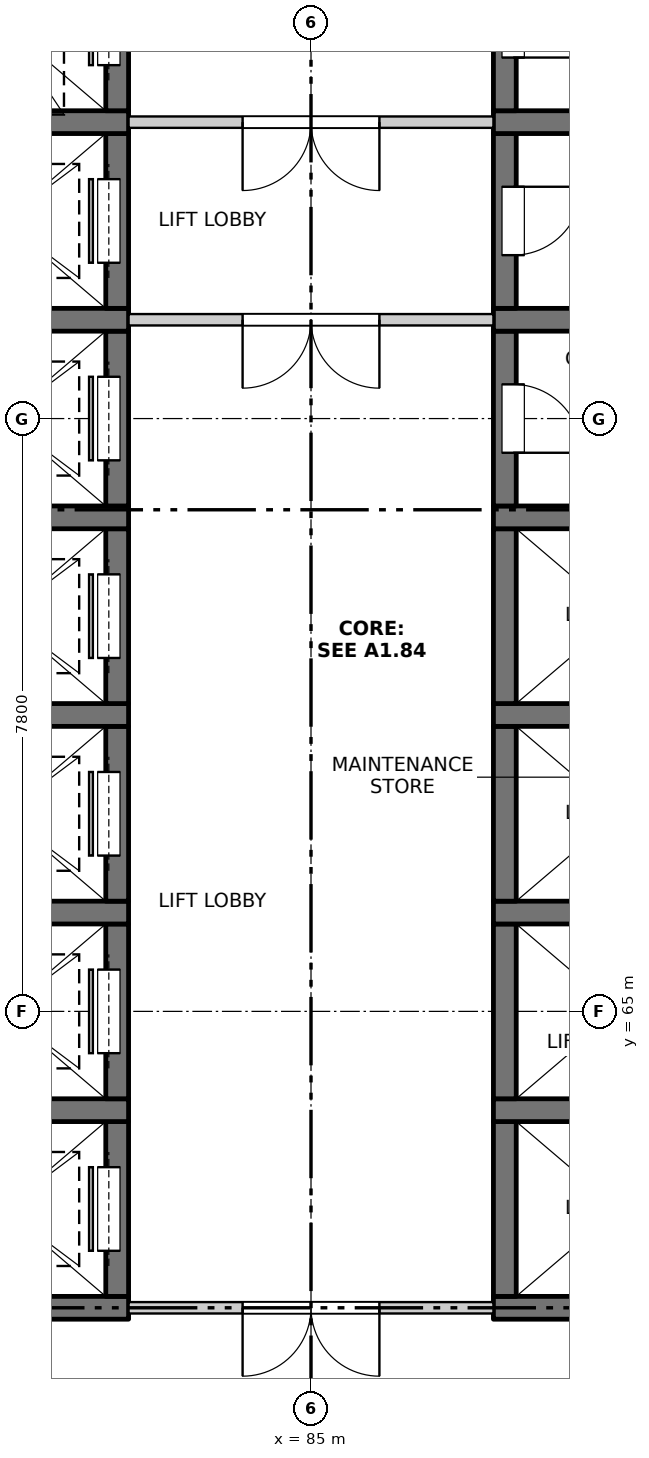
"""IFC4 building model, lengths in metres.
Left out: names, types, materials, properties, quantities, classifications, styles, units other than length and angle.
Written with IfcOpenShell. Run it as: python <this file> out.ifc"""

import sys

from ifc_helpers import new_model, si_unit, direction, frame, frame_2d, origin, place, context, subcontext, project, spatial, rectangle, extrude, element, fill, save


model = new_model("IFC4")
c1 = context("Model", 3, precision=1e-05, world=origin(), true_north=direction((0.0, 1.0)))
c2 = subcontext(c1, "Body", "Model", "MODEL_VIEW")
j1 = project(units=[si_unit("LENGTHUNIT", "METRE"), si_unit("PLANEANGLEUNIT", "RADIAN")], contexts=[c1])
p1 = place(None, origin())
s1 = spatial("IfcSite", under=j1, at=p1, CompositionType="ELEMENT")
p2 = place(p1, origin())
s2 = spatial("IfcBuilding", under=s1, at=p2, CompositionType="ELEMENT")
p3 = place(p2, frame((0.0, 0.0, 99.9)))
s3 = spatial("IfcBuildingStorey", under=s2, at=p3, CompositionType="ELEMENT", Elevation=99.9)
p4 = place(p3, frame((79.6, 61.1, -0.3), z_axis=(0.0, 0.0, 1.0), x_axis=(1.0, 0.0, 0.0)))
e1 = element("IfcWall", 1, at=p4, inside=s3, PredefinedType="SOLIDWALL", context=c2, shape_type="SweptSolid", body=[
    extrude(rectangle(XDim=3.0, YDim=0.3, at=frame_2d((1.5, 0.0))), origin(), (0.0, 0.0, 1.0), 3.45),
])
p5 = place(p3, frame((82.45, 61.25, -0.3), z_axis=(0.0, 0.0, 1.0), x_axis=(0.0, 1.0, 0.0)))
e2 = element("IfcWall", 2, at=p5, inside=s3, PredefinedType="SOLIDWALL", context=c2, shape_type="SweptSolid", body=[
    extrude(rectangle(XDim=2.3, YDim=0.3, at=frame_2d((1.15, 0.0))), origin(), (0.0, 0.0, 1.0), 3.45),
])
p6 = place(p5, frame((0.6, 0.0, 0.3)))
e3 = element("IfcOpeningElement", 3, at=p6, cuts=e2, PredefinedType="OPENING", context=c2, shape_type="SweptSolid", body=[
    extrude(rectangle(XDim=1.1, YDim=2.1, at=frame_2d((0.55, 1.05))), frame((0.0, 0.16, 0.0), z_axis=(0.0, -1.0, 0.0), x_axis=(1.0, 0.0, 0.0)), (0.0, 0.0, 1.0), 0.32),
])
p7 = place(p3, frame((79.6, 63.7, -0.3), z_axis=(0.0, 0.0, 1.0), x_axis=(1.0, 0.0, 0.0)))
e4 = element("IfcWall", 4, at=p7, inside=s3, PredefinedType="SOLIDWALL", context=c2, shape_type="SweptSolid", body=[
    extrude(rectangle(XDim=3.0, YDim=0.3, at=frame_2d((1.5, 0.0))), origin(), (0.0, 0.0, 1.0), 3.45),
])
p8 = place(p3, frame((82.45, 63.85, -0.3), z_axis=(0.0, 0.0, 1.0), x_axis=(0.0, 1.0, 0.0)))
e5 = element("IfcWall", 5, at=p8, inside=s3, PredefinedType="SOLIDWALL", context=c2, shape_type="SweptSolid", body=[
    extrude(rectangle(XDim=2.3, YDim=0.3, at=frame_2d((1.15, 0.0))), origin(), (0.0, 0.0, 1.0), 3.45),
])
p9 = place(p8, frame((0.6, 0.0, 0.3)))
e6 = element("IfcOpeningElement", 6, at=p9, cuts=e5, PredefinedType="OPENING", context=c2, shape_type="SweptSolid", body=[
    extrude(rectangle(XDim=1.1, YDim=2.1, at=frame_2d((0.55, 1.05))), frame((0.0, 0.16, 0.0), z_axis=(0.0, -1.0, 0.0), x_axis=(1.0, 0.0, 0.0)), (0.0, 0.0, 1.0), 0.32),
])
p10 = place(p3, frame((79.6, 66.3, -0.3), z_axis=(0.0, 0.0, 1.0), x_axis=(1.0, 0.0, 0.0)))
e7 = element("IfcWall", 7, at=p10, inside=s3, PredefinedType="SOLIDWALL", context=c2, shape_type="SweptSolid", body=[
    extrude(rectangle(XDim=3.0, YDim=0.3, at=frame_2d((1.5, 0.0))), origin(), (0.0, 0.0, 1.0), 3.45),
])
p11 = place(p3, frame((82.45, 66.45, -0.3), z_axis=(0.0, 0.0, 1.0), x_axis=(0.0, 1.0, 0.0)))
e8 = element("IfcWall", 8, at=p11, inside=s3, PredefinedType="SOLIDWALL", context=c2, shape_type="SweptSolid", body=[
    extrude(rectangle(XDim=2.3, YDim=0.3, at=frame_2d((1.15, 0.0))), origin(), (0.0, 0.0, 1.0), 3.45),
])
p12 = place(p11, frame((0.6, 0.0, 0.3)))
e9 = element("IfcOpeningElement", 9, at=p12, cuts=e8, PredefinedType="OPENING", context=c2, shape_type="SweptSolid", body=[
    extrude(rectangle(XDim=1.1, YDim=2.1, at=frame_2d((0.55, 1.05))), frame((0.0, 0.16, 0.0), z_axis=(0.0, -1.0, 0.0), x_axis=(1.0, 0.0, 0.0)), (0.0, 0.0, 1.0), 0.32),
])
p13 = place(p3, frame((79.6, 68.9, -0.3), z_axis=(0.0, 0.0, 1.0), x_axis=(1.0, 0.0, 0.0)))
e10 = element("IfcWall", 10, at=p13, inside=s3, PredefinedType="SOLIDWALL", context=c2, shape_type="SweptSolid", body=[
    extrude(rectangle(XDim=3.0, YDim=0.3, at=frame_2d((1.5, 0.0))), origin(), (0.0, 0.0, 1.0), 3.45),
])
p14 = place(p3, frame((82.45, 69.05, -0.3), z_axis=(0.0, 0.0, 1.0), x_axis=(0.0, 1.0, 0.0)))
e11 = element("IfcWall", 11, at=p14, inside=s3, PredefinedType="SOLIDWALL", context=c2, shape_type="SweptSolid", body=[
    extrude(rectangle(XDim=2.3, YDim=0.3, at=frame_2d((1.15, 0.0))), origin(), (0.0, 0.0, 1.0), 3.45),
])
p15 = place(p14, frame((0.6, 0.0, 0.3)))
e12 = element("IfcOpeningElement", 12, at=p15, cuts=e11, PredefinedType="OPENING", context=c2, shape_type="SweptSolid", body=[
    extrude(rectangle(XDim=1.1, YDim=2.1, at=frame_2d((0.55, 1.05))), frame((0.0, 0.16, 0.0), z_axis=(0.0, -1.0, 0.0), x_axis=(1.0, 0.0, 0.0)), (0.0, 0.0, 1.0), 0.32),
])
p16 = place(p3, frame((79.6, 71.5, -0.3), z_axis=(0.0, 0.0, 1.0), x_axis=(1.0, 0.0, 0.0)))
e13 = element("IfcWall", 13, at=p16, inside=s3, PredefinedType="SOLIDWALL", context=c2, shape_type="SweptSolid", body=[
    extrude(rectangle(XDim=3.0, YDim=0.3, at=frame_2d((1.5, 0.0))), origin(), (0.0, 0.0, 1.0), 3.45),
])
p17 = place(p3, frame((82.45, 71.65, -0.3), z_axis=(0.0, 0.0, 1.0), x_axis=(0.0, 1.0, 0.0)))
e14 = element("IfcWall", 14, at=p17, inside=s3, PredefinedType="SOLIDWALL", context=c2, shape_type="SweptSolid", body=[
    extrude(rectangle(XDim=2.3, YDim=0.3, at=frame_2d((1.15, 0.0))), origin(), (0.0, 0.0, 1.0), 3.45),
])
p18 = place(p17, frame((0.6, 0.0, 0.3)))
e15 = element("IfcOpeningElement", 15, at=p18, cuts=e14, PredefinedType="OPENING", context=c2, shape_type="SweptSolid", body=[
    extrude(rectangle(XDim=1.1, YDim=2.1, at=frame_2d((0.55, 1.05))), frame((0.0, 0.16, 0.0), z_axis=(0.0, -1.0, 0.0), x_axis=(1.0, 0.0, 0.0)), (0.0, 0.0, 1.0), 0.32),
])
p19 = place(p3, frame((79.6, 74.1, -0.3), z_axis=(0.0, 0.0, 1.0), x_axis=(1.0, 0.0, 0.0)))
e16 = element("IfcWall", 16, at=p19, inside=s3, PredefinedType="SOLIDWALL", context=c2, shape_type="SweptSolid", body=[
    extrude(rectangle(XDim=3.0, YDim=0.3, at=frame_2d((1.5, 0.0))), origin(), (0.0, 0.0, 1.0), 3.45),
])
p20 = place(p3, frame((82.45, 74.25, -0.3), z_axis=(0.0, 0.0, 1.0), x_axis=(0.0, 1.0, 0.0)))
e17 = element("IfcWall", 17, at=p20, inside=s3, PredefinedType="SOLIDWALL", context=c2, shape_type="SweptSolid", body=[
    extrude(rectangle(XDim=2.3, YDim=0.3, at=frame_2d((1.15, 0.0))), origin(), (0.0, 0.0, 1.0), 3.45),
])
p21 = place(p20, frame((0.6, 0.0, 0.3)))
e18 = element("IfcOpeningElement", 18, at=p21, cuts=e17, PredefinedType="OPENING", context=c2, shape_type="SweptSolid", body=[
    extrude(rectangle(XDim=1.1, YDim=2.1, at=frame_2d((0.55, 1.05))), frame((0.0, 0.16, 0.0), z_axis=(0.0, -1.0, 0.0), x_axis=(1.0, 0.0, 0.0)), (0.0, 0.0, 1.0), 0.32),
])
p22 = place(p3, frame((79.6, 76.7, -0.3), z_axis=(0.0, 0.0, 1.0), x_axis=(1.0, 0.0, 0.0)))
e19 = element("IfcWall", 19, at=p22, inside=s3, PredefinedType="SOLIDWALL", context=c2, shape_type="SweptSolid", body=[
    extrude(rectangle(XDim=3.0, YDim=0.3, at=frame_2d((1.5, 0.0))), origin(), (0.0, 0.0, 1.0), 3.45),
])
p23 = place(p3, frame((82.45, 76.85, -0.3), z_axis=(0.0, 0.0, 1.0), x_axis=(0.0, 1.0, 0.0)))
e20 = element("IfcWall", 20, at=p23, inside=s3, PredefinedType="SOLIDWALL", context=c2, shape_type="SweptSolid", body=[
    extrude(rectangle(XDim=2.3, YDim=0.3, at=frame_2d((1.15, 0.0))), origin(), (0.0, 0.0, 1.0), 3.45),
])
p24 = place(p23, frame((0.6, 0.0, 0.3)))
e21 = element("IfcOpeningElement", 21, at=p24, cuts=e20, PredefinedType="OPENING", context=c2, shape_type="SweptSolid", body=[
    extrude(rectangle(XDim=1.1, YDim=2.1, at=frame_2d((0.55, 1.05))), frame((0.0, 0.16, 0.0), z_axis=(0.0, -1.0, 0.0), x_axis=(1.0, 0.0, 0.0)), (0.0, 0.0, 1.0), 0.32),
])
p25 = place(p3, frame((87.4, 61.1, -0.3), z_axis=(0.0, 0.0, 1.0), x_axis=(1.0, 0.0, 0.0)))
e22 = element("IfcWall", 22, at=p25, inside=s3, PredefinedType="SOLIDWALL", context=c2, shape_type="SweptSolid", body=[
    extrude(rectangle(XDim=3.0, YDim=0.3, at=frame_2d((1.5, 0.0))), origin(), (0.0, 0.0, 1.0), 3.45),
])
p26 = place(p3, frame((87.55, 61.25, -0.3), z_axis=(0.0, 0.0, 1.0), x_axis=(0.0, 1.0, 0.0)))
e23 = element("IfcWall", 23, at=p26, inside=s3, PredefinedType="SOLIDWALL", context=c2, shape_type="SweptSolid", body=[
    extrude(rectangle(XDim=2.3, YDim=0.3, at=frame_2d((1.15, 0.0))), origin(), (0.0, 0.0, 1.0), 3.45),
])
p27 = place(p3, frame((87.4, 63.7, -0.3), z_axis=(0.0, 0.0, 1.0), x_axis=(1.0, 0.0, 0.0)))
e24 = element("IfcWall", 24, at=p27, inside=s3, PredefinedType="SOLIDWALL", context=c2, shape_type="SweptSolid", body=[
    extrude(rectangle(XDim=3.0, YDim=0.3, at=frame_2d((1.5, 0.0))), origin(), (0.0, 0.0, 1.0), 3.45),
])
p28 = place(p3, frame((87.55, 63.85, -0.3), z_axis=(0.0, 0.0, 1.0), x_axis=(0.0, 1.0, 0.0)))
e25 = element("IfcWall", 25, at=p28, inside=s3, PredefinedType="SOLIDWALL", context=c2, shape_type="SweptSolid", body=[
    extrude(rectangle(XDim=2.3, YDim=0.3, at=frame_2d((1.15, 0.0))), origin(), (0.0, 0.0, 1.0), 3.45),
])
p29 = place(p3, frame((87.4, 66.3, -0.3), z_axis=(0.0, 0.0, 1.0), x_axis=(1.0, 0.0, 0.0)))
e26 = element("IfcWall", 26, at=p29, inside=s3, PredefinedType="SOLIDWALL", context=c2, shape_type="SweptSolid", body=[
    extrude(rectangle(XDim=3.0, YDim=0.3, at=frame_2d((1.5, 0.0))), origin(), (0.0, 0.0, 1.0), 3.45),
])
p30 = place(p3, frame((87.55, 66.45, -0.3), z_axis=(0.0, 0.0, 1.0), x_axis=(0.0, 1.0, 0.0)))
e27 = element("IfcWall", 27, at=p30, inside=s3, PredefinedType="SOLIDWALL", context=c2, shape_type="SweptSolid", body=[
    extrude(rectangle(XDim=2.3, YDim=0.3, at=frame_2d((1.15, 0.0))), origin(), (0.0, 0.0, 1.0), 3.45),
])
p31 = place(p3, frame((87.4, 68.9, -0.3), z_axis=(0.0, 0.0, 1.0), x_axis=(1.0, 0.0, 0.0)))
e28 = element("IfcWall", 28, at=p31, inside=s3, PredefinedType="SOLIDWALL", context=c2, shape_type="SweptSolid", body=[
    extrude(rectangle(XDim=3.0, YDim=0.3, at=frame_2d((1.5, 0.0))), origin(), (0.0, 0.0, 1.0), 3.45),
])
p32 = place(p3, frame((87.55, 69.05, -0.3), z_axis=(0.0, 0.0, 1.0), x_axis=(0.0, 1.0, 0.0)))
e29 = element("IfcWall", 29, at=p32, inside=s3, PredefinedType="SOLIDWALL", context=c2, shape_type="SweptSolid", body=[
    extrude(rectangle(XDim=2.3, YDim=0.3, at=frame_2d((1.15, 0.0))), origin(), (0.0, 0.0, 1.0), 3.45),
])
p33 = place(p3, frame((87.4, 71.5, -0.3), z_axis=(0.0, 0.0, 1.0), x_axis=(1.0, 0.0, 0.0)))
e30 = element("IfcWall", 30, at=p33, inside=s3, PredefinedType="SOLIDWALL", context=c2, shape_type="SweptSolid", body=[
    extrude(rectangle(XDim=3.0, YDim=0.3, at=frame_2d((1.5, 0.0))), origin(), (0.0, 0.0, 1.0), 3.45),
])
p34 = place(p3, frame((87.55, 71.65, -0.3), z_axis=(0.0, 0.0, 1.0), x_axis=(0.0, 1.0, 0.0)))
e31 = element("IfcWall", 31, at=p34, inside=s3, PredefinedType="SOLIDWALL", context=c2, shape_type="SweptSolid", body=[
    extrude(rectangle(XDim=2.3, YDim=0.3, at=frame_2d((1.15, 0.0))), origin(), (0.0, 0.0, 1.0), 3.45),
])
p35 = place(p34, frame((0.7, 0.0, 0.3)))
e32 = element("IfcOpeningElement", 32, at=p35, cuts=e31, PredefinedType="OPENING", context=c2, shape_type="SweptSolid", body=[
    extrude(rectangle(XDim=0.9, YDim=2.1, at=frame_2d((0.45, 1.05))), frame((0.0, 0.16, 0.0), z_axis=(0.0, -1.0, 0.0), x_axis=(1.0, 0.0, 0.0)), (0.0, 0.0, 1.0), 0.32),
])
p36 = place(p3, frame((87.4, 74.1, -0.3), z_axis=(0.0, 0.0, 1.0), x_axis=(1.0, 0.0, 0.0)))
e33 = element("IfcWall", 33, at=p36, inside=s3, PredefinedType="SOLIDWALL", context=c2, shape_type="SweptSolid", body=[
    extrude(rectangle(XDim=3.0, YDim=0.3, at=frame_2d((1.5, 0.0))), origin(), (0.0, 0.0, 1.0), 3.45),
])
p37 = place(p3, frame((87.55, 74.25, -0.3), z_axis=(0.0, 0.0, 1.0), x_axis=(0.0, 1.0, 0.0)))
e34 = element("IfcWall", 34, at=p37, inside=s3, PredefinedType="SOLIDWALL", context=c2, shape_type="SweptSolid", body=[
    extrude(rectangle(XDim=2.3, YDim=0.3, at=frame_2d((1.15, 0.0))), origin(), (0.0, 0.0, 1.0), 3.45),
])
p38 = place(p37, frame((0.7, 0.0, 0.3)))
e35 = element("IfcOpeningElement", 35, at=p38, cuts=e34, PredefinedType="OPENING", context=c2, shape_type="SweptSolid", body=[
    extrude(rectangle(XDim=0.9, YDim=2.1, at=frame_2d((0.45, 1.05))), frame((0.0, 0.16, 0.0), z_axis=(0.0, -1.0, 0.0), x_axis=(1.0, 0.0, 0.0)), (0.0, 0.0, 1.0), 0.32),
])
p39 = place(p3, frame((87.4, 76.7, -0.3), z_axis=(0.0, 0.0, 1.0), x_axis=(1.0, 0.0, 0.0)))
e36 = element("IfcWall", 36, at=p39, inside=s3, PredefinedType="SOLIDWALL", context=c2, shape_type="SweptSolid", body=[
    extrude(rectangle(XDim=3.0, YDim=0.3, at=frame_2d((1.5, 0.0))), origin(), (0.0, 0.0, 1.0), 3.45),
])
p40 = place(p3, frame((87.55, 76.85, -0.3), z_axis=(0.0, 0.0, 1.0), x_axis=(0.0, 1.0, 0.0)))
e37 = element("IfcWall", 37, at=p40, inside=s3, PredefinedType="SOLIDWALL", context=c2, shape_type="SweptSolid", body=[
    extrude(rectangle(XDim=2.3, YDim=0.3, at=frame_2d((1.15, 0.0))), origin(), (0.0, 0.0, 1.0), 3.45),
])
p41 = place(p40, frame((0.7, 0.0, 0.3)))
e38 = element("IfcOpeningElement", 38, at=p41, cuts=e37, PredefinedType="OPENING", context=c2, shape_type="SweptSolid", body=[
    extrude(rectangle(XDim=0.9, YDim=2.1, at=frame_2d((0.45, 1.05))), frame((0.0, 0.16, 0.0), z_axis=(0.0, -1.0, 0.0), x_axis=(1.0, 0.0, 0.0)), (0.0, 0.0, 1.0), 0.32),
])
p42 = place(p3, frame((82.6, 61.1, 0.0), z_axis=(0.0, 0.0, 1.0), x_axis=(1.0, 0.0, 0.0)))
e39 = element("IfcWall", 39, at=p42, inside=s3, PredefinedType="PARTITIONING", context=c2, shape_type="SweptSolid", body=[
    extrude(rectangle(XDim=4.8, YDim=0.15, at=frame_2d((2.4, 0.0))), origin(), (0.0, 0.0, 1.0), 3.15),
])
p43 = place(p42, frame((1.5, 0.0, 0.0)))
e40 = element("IfcOpeningElement", 40, at=p43, cuts=e39, PredefinedType="OPENING", context=c2, shape_type="SweptSolid", body=[
    extrude(rectangle(XDim=1.8, YDim=2.1, at=frame_2d((0.9, 1.05))), frame((0.0, 0.085, 0.0), z_axis=(0.0, -1.0, 0.0), x_axis=(1.0, 0.0, 0.0)), (0.0, 0.0, 1.0), 0.17),
])
p44 = place(p3, frame((82.6, 74.1, 0.0), z_axis=(0.0, 0.0, 1.0), x_axis=(1.0, 0.0, 0.0)))
e41 = element("IfcWall", 41, at=p44, inside=s3, PredefinedType="PARTITIONING", context=c2, shape_type="SweptSolid", body=[
    extrude(rectangle(XDim=4.8, YDim=0.15, at=frame_2d((2.4, 0.0))), origin(), (0.0, 0.0, 1.0), 3.15),
])
p45 = place(p44, frame((1.5, 0.0, 0.0)))
e42 = element("IfcOpeningElement", 42, at=p45, cuts=e41, PredefinedType="OPENING", context=c2, shape_type="SweptSolid", body=[
    extrude(rectangle(XDim=1.8, YDim=2.1, at=frame_2d((0.9, 1.05))), frame((0.0, 0.085, 0.0), z_axis=(0.0, -1.0, 0.0), x_axis=(1.0, 0.0, 0.0)), (0.0, 0.0, 1.0), 0.17),
])
p46 = place(p3, frame((82.6, 76.7, 0.0), z_axis=(0.0, 0.0, 1.0), x_axis=(1.0, 0.0, 0.0)))
e43 = element("IfcWall", 43, at=p46, inside=s3, PredefinedType="PARTITIONING", context=c2, shape_type="SweptSolid", body=[
    extrude(rectangle(XDim=4.8, YDim=0.15, at=frame_2d((2.4, 0.0))), origin(), (0.0, 0.0, 1.0), 3.15),
])
p47 = place(p46, frame((1.5, 0.0, 0.0)))
e44 = element("IfcOpeningElement", 44, at=p47, cuts=e43, PredefinedType="OPENING", context=c2, shape_type="SweptSolid", body=[
    extrude(rectangle(XDim=1.8, YDim=2.1, at=frame_2d((0.9, 1.05))), frame((0.0, 0.085, 0.0), z_axis=(0.0, -1.0, 0.0), x_axis=(1.0, 0.0, 0.0)), (0.0, 0.0, 1.0), 0.17),
])
p48 = place(p43, origin())
e45 = element("IfcDoor", 45, at=p48, inside=s3, OperationType="DOUBLE_DOOR_SINGLE_SWING", PredefinedType="DOOR", context=c2, shape_type="SweptSolid", body=[
    extrude(rectangle(XDim=1.8, YDim=2.1, at=frame_2d((0.9, 1.05))), frame((0.0, 0.025, 0.0), z_axis=(0.0, -1.0, 0.0), x_axis=(1.0, 0.0, 0.0)), (0.0, 0.0, 1.0), 0.05),
])
fill(e40, e45)
p49 = place(p6, origin())
e46 = element("IfcDoor", 46, at=p49, inside=s3, OperationType="SLIDING_TO_RIGHT", PredefinedType="DOOR", context=c2, shape_type="SweptSolid", body=[
    extrude(rectangle(XDim=1.1, YDim=2.1, at=frame_2d((0.55, 1.05))), frame((0.0, 0.135, 0.0), z_axis=(0.0, -1.0, 0.0), x_axis=(1.0, 0.0, 0.0)), (0.0, 0.0, 1.0), 0.05),
])
fill(e3, e46)
p50 = place(p9, origin())
e47 = element("IfcDoor", 47, at=p50, inside=s3, OperationType="SLIDING_TO_RIGHT", PredefinedType="DOOR", context=c2, shape_type="SweptSolid", body=[
    extrude(rectangle(XDim=1.1, YDim=2.1, at=frame_2d((0.55, 1.05))), frame((0.0, 0.135, 0.0), z_axis=(0.0, -1.0, 0.0), x_axis=(1.0, 0.0, 0.0)), (0.0, 0.0, 1.0), 0.05),
])
fill(e6, e47)
p51 = place(p12, origin())
e48 = element("IfcDoor", 48, at=p51, inside=s3, OperationType="SLIDING_TO_RIGHT", PredefinedType="DOOR", context=c2, shape_type="SweptSolid", body=[
    extrude(rectangle(XDim=1.1, YDim=2.1, at=frame_2d((0.55, 1.05))), frame((0.0, 0.135, 0.0), z_axis=(0.0, -1.0, 0.0), x_axis=(1.0, 0.0, 0.0)), (0.0, 0.0, 1.0), 0.05),
])
fill(e9, e48)
p52 = place(p15, origin())
e49 = element("IfcDoor", 49, at=p52, inside=s3, OperationType="SLIDING_TO_LEFT", PredefinedType="DOOR", context=c2, shape_type="SweptSolid", body=[
    extrude(rectangle(XDim=1.1, YDim=2.1, at=frame_2d((0.55, 1.05))), frame((0.0, 0.135, 0.0), z_axis=(0.0, -1.0, 0.0), x_axis=(1.0, 0.0, 0.0)), (0.0, 0.0, 1.0), 0.05),
])
fill(e12, e49)
p53 = place(p18, origin())
e50 = element("IfcDoor", 50, at=p53, inside=s3, OperationType="SLIDING_TO_LEFT", PredefinedType="DOOR", context=c2, shape_type="SweptSolid", body=[
    extrude(rectangle(XDim=1.1, YDim=2.1, at=frame_2d((0.55, 1.05))), frame((0.0, 0.135, 0.0), z_axis=(0.0, -1.0, 0.0), x_axis=(1.0, 0.0, 0.0)), (0.0, 0.0, 1.0), 0.05),
])
fill(e15, e50)
p54 = place(p35, origin())
e51 = element("IfcDoor", 51, at=p54, inside=s3, OperationType="SINGLE_SWING_RIGHT", PredefinedType="DOOR", context=c2, shape_type="SweptSolid", body=[
    extrude(rectangle(XDim=0.9, YDim=2.1, at=frame_2d((0.45, 1.05))), frame((0.0, -0.085, 0.0), z_axis=(0.0, -1.0, 0.0), x_axis=(1.0, 0.0, 0.0)), (0.0, 0.0, 1.0), 0.05),
])
fill(e32, e51)
p55 = place(p45, origin())
e52 = element("IfcDoor", 52, at=p55, inside=s3, OperationType="DOUBLE_DOOR_SINGLE_SWING", PredefinedType="DOOR", context=c2, shape_type="SweptSolid", body=[
    extrude(rectangle(XDim=1.8, YDim=2.1, at=frame_2d((0.9, 1.05))), frame((0.0, 0.025, 0.0), z_axis=(0.0, -1.0, 0.0), x_axis=(1.0, 0.0, 0.0)), (0.0, 0.0, 1.0), 0.05),
])
fill(e42, e52)
p56 = place(p21, origin())
e53 = element("IfcDoor", 53, at=p56, inside=s3, OperationType="SLIDING_TO_LEFT", PredefinedType="DOOR", context=c2, shape_type="SweptSolid", body=[
    extrude(rectangle(XDim=1.1, YDim=2.1, at=frame_2d((0.55, 1.05))), frame((0.0, 0.135, 0.0), z_axis=(0.0, -1.0, 0.0), x_axis=(1.0, 0.0, 0.0)), (0.0, 0.0, 1.0), 0.05),
])
fill(e18, e53)
p57 = place(p38, origin())
e54 = element("IfcDoor", 54, at=p57, inside=s3, OperationType="SINGLE_SWING_LEFT", PredefinedType="DOOR", context=c2, shape_type="SweptSolid", body=[
    extrude(rectangle(XDim=0.9, YDim=2.1, at=frame_2d((0.45, 1.05))), frame((0.0, -0.085, 0.0), z_axis=(0.0, -1.0, 0.0), x_axis=(1.0, 0.0, 0.0)), (0.0, 0.0, 1.0), 0.05),
])
fill(e35, e54)
p58 = place(p47, origin())
e55 = element("IfcDoor", 55, at=p58, inside=s3, OperationType="DOUBLE_DOOR_SINGLE_SWING", PredefinedType="DOOR", context=c2, shape_type="SweptSolid", body=[
    extrude(rectangle(XDim=1.8, YDim=2.1, at=frame_2d((0.9, 1.05))), frame((0.0, 0.025, 0.0), z_axis=(0.0, -1.0, 0.0), x_axis=(1.0, 0.0, 0.0)), (0.0, 0.0, 1.0), 0.05),
])
fill(e44, e55)
p59 = place(p24, origin())
e56 = element("IfcDoor", 56, at=p59, inside=s3, OperationType="SLIDING_TO_LEFT", PredefinedType="DOOR", context=c2, shape_type="SweptSolid", body=[
    extrude(rectangle(XDim=1.1, YDim=2.1, at=frame_2d((0.55, 1.05))), frame((0.0, 0.135, 0.0), z_axis=(0.0, -1.0, 0.0), x_axis=(1.0, 0.0, 0.0)), (0.0, 0.0, 1.0), 0.05),
])
fill(e21, e56)
p60 = place(p41, origin())
e57 = element("IfcDoor", 57, at=p60, inside=s3, OperationType="SINGLE_SWING_RIGHT", PredefinedType="DOOR", context=c2, shape_type="SweptSolid", body=[
    extrude(rectangle(XDim=0.9, YDim=2.1, at=frame_2d((0.45, 1.05))), frame((0.0, -0.085, 0.0), z_axis=(0.0, -1.0, 0.0), x_axis=(1.0, 0.0, 0.0)), (0.0, 0.0, 1.0), 0.05),
])
fill(e38, e57)
save(model, sys.argv[1])
